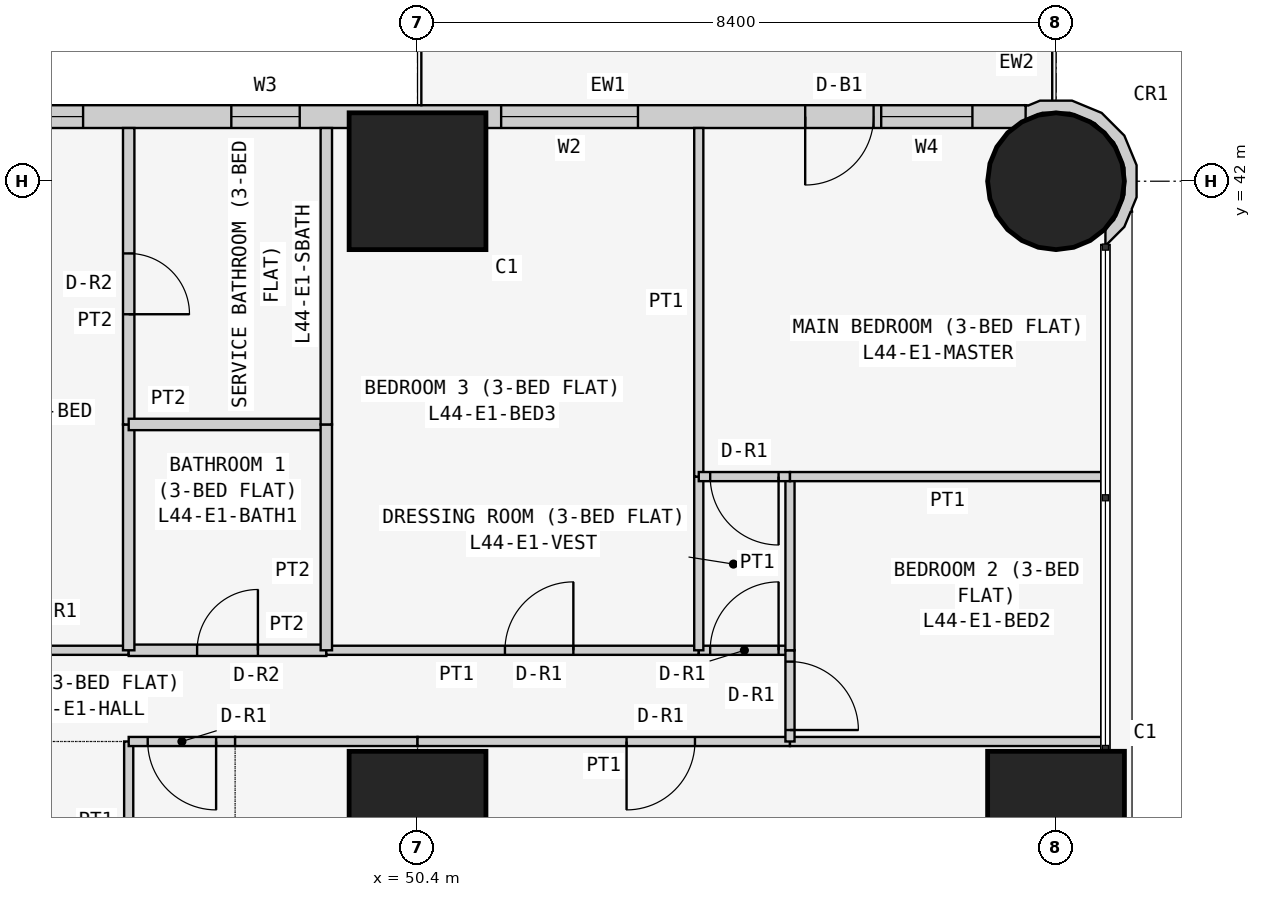
"""IFC4 building model, lengths in metres.
Left out: names, types, materials, properties, quantities, classifications, styles, units other than length and angle.
Written with IfcOpenShell. Run it as: python <this file> out.ifc"""

import sys

from ifc_helpers import new_model, si_unit, direction, frame, frame_2d, origin, origin_2d, place, context, subcontext, project, spatial, polyline, rectangle, circle, outline, extrude, element, fill, save


model = new_model("IFC4")
c1 = context("Model", 3, precision=1e-05, world=origin(), true_north=direction((0.0, 1.0)))
c2 = subcontext(c1, "Body", "Model", "MODEL_VIEW")
j1 = project(units=[si_unit("LENGTHUNIT", "METRE"), si_unit("PLANEANGLEUNIT", "RADIAN")], contexts=[c1])
p1 = place(None, origin())
s1 = spatial("IfcSite", under=j1, at=p1, CompositionType="ELEMENT")
p2 = place(p1, origin())
s2 = spatial("IfcBuilding", under=s1, at=p2, CompositionType="ELEMENT")
p3 = place(p2, frame((0.0, 0.0, 170.1)))
s3 = spatial("IfcBuildingStorey", under=s2, at=p3, CompositionType="ELEMENT", Elevation=170.1)
for number, where, z_axis, x_axis in (
    (1, (50.4, 33.6, 0.0), (0.0, 0.0, 1.0), (1.0, 0.0, 0.0)),
    (2, (50.4, 42.0, 0.0), (0.0, 0.0, 1.0), (1.0, 0.0, 0.0)),
    (3, (58.8, 33.6, 0.0), (0.0, 0.0, 1.0), (1.0, 0.0, 0.0)),
):
    element("IfcColumn", number, at=place(p3, frame(where, z_axis=z_axis, x_axis=x_axis)), inside=s3, PredefinedType="COLUMN", context=c2, shape_type="SweptSolid", body=[
        extrude(rectangle(XDim=1.8, YDim=1.8, at=origin_2d()), origin(), (0.0, 0.0, 1.0), 3.6),
    ])
p4 = place(p3, frame((58.8, 42.0, 0.0), z_axis=(0.0, 0.0, 1.0), x_axis=(1.0, 0.0, 0.0)))
e4 = element("IfcColumn", 4, at=p4, inside=s3, PredefinedType="COLUMN", context=c2, shape_type="SweptSolid", body=[
    extrude(circle(Radius=0.9, at=origin_2d()), origin(), (0.0, 0.0, 1.0), 3.6),
])
p5 = place(p3, frame((58.4, 42.85, 0.0), z_axis=(0.0, 0.0, 1.0), x_axis=(-1.0, 0.0, 0.0)))
e5 = element("IfcWall", 5, at=p5, inside=s3, PredefinedType="SOLIDWALL", context=c2, shape_type="SweptSolid", body=[
    extrude(rectangle(XDim=15.7, YDim=0.3, at=frame_2d((7.85, 0.0))), origin(), (0.0, 0.0, 1.0), 3.45),
])
p6 = place(p5, frame((12.4, 0.0, 0.9)))
e6 = element("IfcOpeningElement", 6, at=p6, cuts=e5, PredefinedType="OPENING", context=c2, shape_type="SweptSolid", body=[
    extrude(rectangle(XDim=1.8, YDim=1.5, at=frame_2d((0.9, 0.75))), frame((0.0, 0.16, 0.0), z_axis=(0.0, -1.0, 0.0), x_axis=(1.0, 0.0, 0.0)), (0.0, 0.0, 1.0), 0.32),
])
p7 = place(p5, frame((9.55, 0.0, 1.5)))
e7 = element("IfcOpeningElement", 7, at=p7, cuts=e5, PredefinedType="OPENING", context=c2, shape_type="SweptSolid", body=[
    extrude(rectangle(XDim=0.9, YDim=0.7, at=frame_2d((0.45, 0.35))), frame((0.0, 0.16, 0.0), z_axis=(0.0, -1.0, 0.0), x_axis=(1.0, 0.0, 0.0)), (0.0, 0.0, 1.0), 0.32),
])
p8 = place(p5, frame((5.1, 0.0, 0.9)))
e8 = element("IfcOpeningElement", 8, at=p8, cuts=e5, PredefinedType="OPENING", context=c2, shape_type="SweptSolid", body=[
    extrude(rectangle(XDim=1.8, YDim=1.5, at=frame_2d((0.9, 0.75))), frame((0.0, 0.16, 0.0), z_axis=(0.0, -1.0, 0.0), x_axis=(1.0, 0.0, 0.0)), (0.0, 0.0, 1.0), 0.32),
])
p9 = place(p5, frame((2.0, 0.0, 0.0)))
e9 = element("IfcOpeningElement", 9, at=p9, cuts=e5, PredefinedType="OPENING", context=c2, shape_type="SweptSolid", body=[
    extrude(rectangle(XDim=0.9, YDim=2.4, at=frame_2d((0.45, 1.2))), frame((0.0, 0.16, 0.0), z_axis=(0.0, -1.0, 0.0), x_axis=(1.0, 0.0, 0.0)), (0.0, 0.0, 1.0), 0.32),
])
p10 = place(p5, frame((0.7, 0.0, 0.9)))
e10 = element("IfcOpeningElement", 10, at=p10, cuts=e5, PredefinedType="OPENING", context=c2, shape_type="SweptSolid", body=[
    extrude(rectangle(XDim=1.2, YDim=1.5, at=frame_2d((0.6, 0.75))), frame((0.0, 0.16, 0.0), z_axis=(0.0, -1.0, 0.0), x_axis=(1.0, 0.0, 0.0)), (0.0, 0.0, 1.0), 0.32),
])
p11 = place(p3, frame((59.411, 41.233, 0.0), z_axis=(0.0, 0.0, 1.0), x_axis=(0.926129809145, 0.377204953059, 0.0)))
e11 = element("IfcWall", 11, at=p11, inside=s3, PredefinedType="SOLIDWALL", context=c2, shape_type="SweptSolid", body=[
    extrude(outline(polyline([(0.626, 0.345), (0.785, 0.736), (0.782, 1.157), (0.619, 1.546), (0.319, 1.843), (-0.072, 2.002), (-0.24, 2.001), (-0.27, 2.017), (-0.37, 1.841), (-0.102, 1.842), (0.23, 1.707), (0.485, 1.455), (0.624, 1.125), (0.626, 0.766), (0.491, 0.434), (0.238, 0.179), (0.09, 0.117), (0.011, -0.078), (0.024, -0.083), (0.329, 0.045), (0.48, 0.198), (0.499, 0.193), (0.508, 0.225), (0.626, 0.345)])), origin(), (0.0, 0.0, 1.0), 3.45),
])
p12 = place(p3, frame((46.6, 29.4, 0.0), z_axis=(0.0, 0.0, 1.0), x_axis=(0.0, 1.0, 0.0)))
e12 = element("IfcWall", 12, at=p12, inside=s3, PredefinedType="PARTITIONING", context=c2, shape_type="SweptSolid", body=[
    extrude(rectangle(XDim=5.229, YDim=0.12, at=frame_2d((2.615, 0.0))), origin(), (0.0, 0.0, 1.0), 3.45),
])
p13 = place(p3, frame((48.0, 34.629, 0.0), z_axis=(0.0, 0.0, 1.0), x_axis=(-1.0, 0.0, 0.0)))
e13 = element("IfcWall", 13, at=p13, inside=s3, PredefinedType="PARTITIONING", context=c2, shape_type="SweptSolid", body=[
    extrude(rectangle(XDim=1.4, YDim=0.12, at=frame_2d((0.7, 0.0))), origin(), (0.0, 0.0, 1.0), 3.45),
])
p14 = place(p13, frame((0.25, 0.0, 0.0)))
e14 = element("IfcOpeningElement", 14, at=p14, cuts=e13, PredefinedType="OPENING", context=c2, shape_type="SweptSolid", body=[
    extrude(rectangle(XDim=0.9, YDim=2.1, at=frame_2d((0.45, 1.05))), frame((0.0, 0.07, 0.0), z_axis=(0.0, -1.0, 0.0), x_axis=(1.0, 0.0, 0.0)), (0.0, 0.0, 1.0), 0.14),
])
p15 = place(p3, frame((50.4, 34.629, 0.0), z_axis=(0.0, 0.0, 1.0), x_axis=(-1.0, 0.0, 0.0)))
e15 = element("IfcWall", 15, at=p15, inside=s3, PredefinedType="PARTITIONING", context=c2, shape_type="SweptSolid", body=[
    extrude(rectangle(XDim=2.4, YDim=0.12, at=frame_2d((1.2, 0.0))), origin(), (0.0, 0.0, 1.0), 3.45),
])
p16 = place(p3, frame((55.3, 34.629, 0.0), z_axis=(0.0, 0.0, 1.0), x_axis=(-1.0, 0.0, 0.0)))
e16 = element("IfcWall", 16, at=p16, inside=s3, PredefinedType="PARTITIONING", context=c2, shape_type="SweptSolid", body=[
    extrude(rectangle(XDim=4.9, YDim=0.12, at=frame_2d((2.45, 0.0))), origin(), (0.0, 0.0, 1.0), 3.45),
])
p17 = place(p16, frame((1.25, 0.0, 0.0)))
e17 = element("IfcOpeningElement", 17, at=p17, cuts=e16, PredefinedType="OPENING", context=c2, shape_type="SweptSolid", body=[
    extrude(rectangle(XDim=0.9, YDim=2.1, at=frame_2d((0.45, 1.05))), frame((0.0, 0.07, 0.0), z_axis=(0.0, -1.0, 0.0), x_axis=(1.0, 0.0, 0.0)), (0.0, 0.0, 1.0), 0.14),
])
p18 = place(p3, frame((59.45, 34.629, 0.0), z_axis=(0.0, 0.0, 1.0), x_axis=(-1.0, 0.0, 0.0)))
e18 = element("IfcWall", 18, at=p18, inside=s3, PredefinedType="PARTITIONING", context=c2, shape_type="SweptSolid", body=[
    extrude(rectangle(XDim=4.15, YDim=0.12, at=frame_2d((2.075, 0.0))), origin(), (0.0, 0.0, 1.0), 3.45),
])
p19 = place(p3, frame((46.6, 35.829, 0.0), z_axis=(0.0, 0.0, 1.0), x_axis=(-1.0, 0.0, 0.0)))
e19 = element("IfcWall", 19, at=p19, inside=s3, PredefinedType="PARTITIONING", context=c2, shape_type="SweptSolid", body=[
    extrude(rectangle(XDim=3.575, YDim=0.12, at=frame_2d((1.788, 0.0))), origin(), (0.0, 0.0, 1.0), 3.45),
])
p20 = place(p19, frame((1.35, 0.0, 0.0)))
e20 = element("IfcOpeningElement", 20, at=p20, cuts=e19, PredefinedType="OPENING", context=c2, shape_type="SweptSolid", body=[
    extrude(rectangle(XDim=0.9, YDim=2.1, at=frame_2d((0.45, 1.05))), frame((0.0, 0.07, 0.0), z_axis=(0.0, -1.0, 0.0), x_axis=(1.0, 0.0, 0.0)), (0.0, 0.0, 1.0), 0.14),
])
p21 = place(p3, frame((49.2, 35.829, 0.0), z_axis=(0.0, 0.0, 1.0), x_axis=(-1.0, 0.0, 0.0)))
e21 = element("IfcWall", 21, at=p21, inside=s3, PredefinedType="PARTITIONING", context=c2, shape_type="SweptSolid", body=[
    extrude(rectangle(XDim=2.6, YDim=0.15, at=frame_2d((1.3, 0.0))), origin(), (0.0, 0.0, 1.0), 3.45),
])
p22 = place(p21, frame((0.9, 0.0, 0.0)))
e22 = element("IfcOpeningElement", 22, at=p22, cuts=e21, PredefinedType="OPENING", context=c2, shape_type="SweptSolid", body=[
    extrude(rectangle(XDim=0.8, YDim=2.1, at=frame_2d((0.4, 1.05))), frame((0.0, 0.085, 0.0), z_axis=(0.0, -1.0, 0.0), x_axis=(1.0, 0.0, 0.0)), (0.0, 0.0, 1.0), 0.17),
])
p23 = place(p3, frame((54.1, 35.829, 0.0), z_axis=(0.0, 0.0, 1.0), x_axis=(-1.0, 0.0, 0.0)))
e23 = element("IfcWall", 23, at=p23, inside=s3, PredefinedType="PARTITIONING", context=c2, shape_type="SweptSolid", body=[
    extrude(rectangle(XDim=4.9, YDim=0.12, at=frame_2d((2.45, 0.0))), origin(), (0.0, 0.0, 1.0), 3.45),
])
p24 = place(p23, frame((1.65, 0.0, 0.0)))
e24 = element("IfcOpeningElement", 24, at=p24, cuts=e23, PredefinedType="OPENING", context=c2, shape_type="SweptSolid", body=[
    extrude(rectangle(XDim=0.9, YDim=2.1, at=frame_2d((0.45, 1.05))), frame((0.0, 0.07, 0.0), z_axis=(0.0, -1.0, 0.0), x_axis=(1.0, 0.0, 0.0)), (0.0, 0.0, 1.0), 0.14),
])
p25 = place(p3, frame((55.3, 35.829, 0.0), z_axis=(0.0, 0.0, 1.0), x_axis=(-1.0, 0.0, 0.0)))
e25 = element("IfcWall", 25, at=p25, inside=s3, PredefinedType="PARTITIONING", context=c2, shape_type="SweptSolid", body=[
    extrude(rectangle(XDim=1.2, YDim=0.12, at=frame_2d((0.6, 0.0))), origin(), (0.0, 0.0, 1.0), 3.45),
])
p26 = place(p25, frame((0.15, 0.0, 0.0)))
e26 = element("IfcOpeningElement", 26, at=p26, cuts=e25, PredefinedType="OPENING", context=c2, shape_type="SweptSolid", body=[
    extrude(rectangle(XDim=0.9, YDim=2.1, at=frame_2d((0.45, 1.05))), frame((0.0, 0.07, 0.0), z_axis=(0.0, -1.0, 0.0), x_axis=(1.0, 0.0, 0.0)), (0.0, 0.0, 1.0), 0.14),
])
p27 = place(p3, frame((55.3, 34.629, 0.0), z_axis=(0.0, 0.0, 1.0), x_axis=(0.0, 1.0, 0.0)))
e27 = element("IfcWall", 27, at=p27, inside=s3, PredefinedType="PARTITIONING", context=c2, shape_type="SweptSolid", body=[
    extrude(rectangle(XDim=1.2, YDim=0.12, at=frame_2d((0.6, 0.0))), origin(), (0.0, 0.0, 1.0), 3.45),
])
p28 = place(p27, frame((0.151, 0.0, 0.0)))
e28 = element("IfcOpeningElement", 28, at=p28, cuts=e27, PredefinedType="OPENING", context=c2, shape_type="SweptSolid", body=[
    extrude(rectangle(XDim=0.9, YDim=2.1, at=frame_2d((0.45, 1.05))), frame((0.0, 0.07, 0.0), z_axis=(0.0, -1.0, 0.0), x_axis=(1.0, 0.0, 0.0)), (0.0, 0.0, 1.0), 0.14),
])
p29 = place(p3, frame((46.6, 35.829, 0.0), z_axis=(0.0, 0.0, 1.0), x_axis=(0.0, 1.0, 0.0)))
e29 = element("IfcWall", 29, at=p29, inside=s3, PredefinedType="PARTITIONING", context=c2, shape_type="SweptSolid", body=[
    extrude(rectangle(XDim=2.971, YDim=0.15, at=frame_2d((1.485, 0.0))), origin(), (0.0, 0.0, 1.0), 3.45),
])
p30 = place(p3, frame((46.6, 38.8, 0.0), z_axis=(0.0, 0.0, 1.0), x_axis=(0.0, 1.0, 0.0)))
e30 = element("IfcWall", 30, at=p30, inside=s3, PredefinedType="PARTITIONING", context=c2, shape_type="SweptSolid", body=[
    extrude(rectangle(XDim=3.9, YDim=0.15, at=frame_2d((1.95, 0.0))), origin(), (0.0, 0.0, 1.0), 3.45),
])
p31 = place(p30, frame((1.45, 0.0, 0.0)))
e31 = element("IfcOpeningElement", 31, at=p31, cuts=e30, PredefinedType="OPENING", context=c2, shape_type="SweptSolid", body=[
    extrude(rectangle(XDim=0.8, YDim=2.1, at=frame_2d((0.4, 1.05))), frame((0.0, 0.085, 0.0), z_axis=(0.0, -1.0, 0.0), x_axis=(1.0, 0.0, 0.0)), (0.0, 0.0, 1.0), 0.17),
])
p32 = place(p3, frame((49.2, 38.8, 0.0), z_axis=(0.0, 0.0, 1.0), x_axis=(-1.0, 0.0, 0.0)))
e32 = element("IfcWall", 32, at=p32, inside=s3, PredefinedType="PARTITIONING", context=c2, shape_type="SweptSolid", body=[
    extrude(rectangle(XDim=2.6, YDim=0.15, at=frame_2d((1.3, 0.0))), origin(), (0.0, 0.0, 1.0), 3.45),
])
p33 = place(p3, frame((49.2, 35.829, 0.0), z_axis=(0.0, 0.0, 1.0), x_axis=(0.0, 1.0, 0.0)))
e33 = element("IfcWall", 33, at=p33, inside=s3, PredefinedType="PARTITIONING", context=c2, shape_type="SweptSolid", body=[
    extrude(rectangle(XDim=2.971, YDim=0.15, at=frame_2d((1.485, 0.0))), origin(), (0.0, 0.0, 1.0), 3.45),
])
p34 = place(p3, frame((49.2, 38.8, 0.0), z_axis=(0.0, 0.0, 1.0), x_axis=(0.0, 1.0, 0.0)))
e34 = element("IfcWall", 34, at=p34, inside=s3, PredefinedType="PARTITIONING", context=c2, shape_type="SweptSolid", body=[
    extrude(rectangle(XDim=3.9, YDim=0.15, at=frame_2d((1.95, 0.0))), origin(), (0.0, 0.0, 1.0), 3.45),
])
p35 = place(p3, frame((54.1, 35.829, 0.0), z_axis=(0.0, 0.0, 1.0), x_axis=(0.0, 1.0, 0.0)))
e35 = element("IfcWall", 35, at=p35, inside=s3, PredefinedType="PARTITIONING", context=c2, shape_type="SweptSolid", body=[
    extrude(rectangle(XDim=2.285, YDim=0.12, at=frame_2d((1.143, 0.0))), origin(), (0.0, 0.0, 1.0), 3.45),
])
p36 = place(p3, frame((54.1, 38.114, 0.0), z_axis=(0.0, 0.0, 1.0), x_axis=(0.0, 1.0, 0.0)))
e36 = element("IfcWall", 36, at=p36, inside=s3, PredefinedType="PARTITIONING", context=c2, shape_type="SweptSolid", body=[
    extrude(rectangle(XDim=4.586, YDim=0.12, at=frame_2d((2.293, 0.0))), origin(), (0.0, 0.0, 1.0), 3.45),
])
p37 = place(p3, frame((55.3, 35.829, 0.0), z_axis=(0.0, 0.0, 1.0), x_axis=(0.0, 1.0, 0.0)))
e37 = element("IfcWall", 37, at=p37, inside=s3, PredefinedType="PARTITIONING", context=c2, shape_type="SweptSolid", body=[
    extrude(rectangle(XDim=2.285, YDim=0.12, at=frame_2d((1.143, 0.0))), origin(), (0.0, 0.0, 1.0), 3.45),
])
p38 = place(p3, frame((55.3, 38.114, 0.0), z_axis=(0.0, 0.0, 1.0), x_axis=(-1.0, 0.0, 0.0)))
e38 = element("IfcWall", 38, at=p38, inside=s3, PredefinedType="PARTITIONING", context=c2, shape_type="SweptSolid", body=[
    extrude(rectangle(XDim=1.2, YDim=0.12, at=frame_2d((0.6, 0.0))), origin(), (0.0, 0.0, 1.0), 3.45),
])
p39 = place(p38, frame((0.15, 0.0, 0.0)))
e39 = element("IfcOpeningElement", 39, at=p39, cuts=e38, PredefinedType="OPENING", context=c2, shape_type="SweptSolid", body=[
    extrude(rectangle(XDim=0.9, YDim=2.1, at=frame_2d((0.45, 1.05))), frame((0.0, 0.07, 0.0), z_axis=(0.0, -1.0, 0.0), x_axis=(1.0, 0.0, 0.0)), (0.0, 0.0, 1.0), 0.14),
])
p40 = place(p3, frame((59.45, 38.114, 0.0), z_axis=(0.0, 0.0, 1.0), x_axis=(-1.0, 0.0, 0.0)))
e40 = element("IfcWall", 40, at=p40, inside=s3, PredefinedType="PARTITIONING", context=c2, shape_type="SweptSolid", body=[
    extrude(rectangle(XDim=4.15, YDim=0.12, at=frame_2d((2.075, 0.0))), origin(), (0.0, 0.0, 1.0), 3.45),
])
p41 = place(p6, origin())
e41 = element("IfcWindow", 41, at=p41, inside=s3, PartitioningType="SINGLE_PANEL", PredefinedType="WINDOW", context=c2, shape_type="SweptSolid", body=[
    extrude(rectangle(XDim=1.8, YDim=1.5, at=frame_2d((0.9, 0.75))), frame((0.0, 0.03, 0.0), z_axis=(0.0, -1.0, 0.0), x_axis=(1.0, 0.0, 0.0)), (0.0, 0.0, 1.0), 0.06),
])
fill(e6, e41)
p42 = place(p7, origin())
e42 = element("IfcWindow", 42, at=p42, inside=s3, PartitioningType="SINGLE_PANEL", PredefinedType="WINDOW", context=c2, shape_type="SweptSolid", body=[
    extrude(rectangle(XDim=0.9, YDim=0.7, at=frame_2d((0.45, 0.35))), frame((0.0, 0.03, 0.0), z_axis=(0.0, -1.0, 0.0), x_axis=(1.0, 0.0, 0.0)), (0.0, 0.0, 1.0), 0.06),
])
fill(e7, e42)
p43 = place(p8, origin())
e43 = element("IfcWindow", 43, at=p43, inside=s3, PartitioningType="SINGLE_PANEL", PredefinedType="WINDOW", context=c2, shape_type="SweptSolid", body=[
    extrude(rectangle(XDim=1.8, YDim=1.5, at=frame_2d((0.9, 0.75))), frame((0.0, 0.03, 0.0), z_axis=(0.0, -1.0, 0.0), x_axis=(1.0, 0.0, 0.0)), (0.0, 0.0, 1.0), 0.06),
])
fill(e8, e43)
p44 = place(p9, origin())
e44 = element("IfcDoor", 44, at=p44, inside=s3, OperationType="SINGLE_SWING_RIGHT", PredefinedType="DOOR", context=c2, shape_type="SweptSolid", body=[
    extrude(rectangle(XDim=0.9, YDim=2.4, at=frame_2d((0.45, 1.2))), frame((0.0, 0.025, 0.0), z_axis=(0.0, -1.0, 0.0), x_axis=(1.0, 0.0, 0.0)), (0.0, 0.0, 1.0), 0.05),
])
fill(e9, e44)
p45 = place(p10, origin())
e45 = element("IfcWindow", 45, at=p45, inside=s3, PartitioningType="SINGLE_PANEL", PredefinedType="WINDOW", context=c2, shape_type="SweptSolid", body=[
    extrude(rectangle(XDim=1.2, YDim=1.5, at=frame_2d((0.6, 0.75))), frame((0.0, 0.03, 0.0), z_axis=(0.0, -1.0, 0.0), x_axis=(1.0, 0.0, 0.0)), (0.0, 0.0, 1.0), 0.06),
])
fill(e10, e45)
p46 = place(p14, origin())
e46 = element("IfcDoor", 46, at=p46, inside=s3, OperationType="SINGLE_SWING_LEFT", PredefinedType="DOOR", context=c2, shape_type="SweptSolid", body=[
    extrude(rectangle(XDim=0.9, YDim=2.1, at=frame_2d((0.45, 1.05))), frame((0.0, 0.025, 0.0), z_axis=(0.0, -1.0, 0.0), x_axis=(1.0, 0.0, 0.0)), (0.0, 0.0, 1.0), 0.05),
])
fill(e14, e46)
p47 = place(p17, origin())
e47 = element("IfcDoor", 47, at=p47, inside=s3, OperationType="SINGLE_SWING_RIGHT", PredefinedType="DOOR", context=c2, shape_type="SweptSolid", body=[
    extrude(rectangle(XDim=0.9, YDim=2.1, at=frame_2d((0.45, 1.05))), frame((0.0, 0.025, 0.0), z_axis=(0.0, -1.0, 0.0), x_axis=(1.0, 0.0, 0.0)), (0.0, 0.0, 1.0), 0.05),
])
fill(e17, e47)
p48 = place(p31, frame((0.8, 0.0, 0.0), z_axis=(0.0, 0.0, 1.0), x_axis=(-1.0, 0.0, 0.0)))
e48 = element("IfcDoor", 48, at=p48, inside=s3, OperationType="SINGLE_SWING_RIGHT", PredefinedType="DOOR", context=c2, shape_type="SweptSolid", body=[
    extrude(rectangle(XDim=0.8, YDim=2.1, at=frame_2d((0.4, 1.05))), frame((0.0, 0.025, 0.0), z_axis=(0.0, -1.0, 0.0), x_axis=(1.0, 0.0, 0.0)), (0.0, 0.0, 1.0), 0.05),
])
fill(e31, e48)
p49 = place(p22, frame((0.8, 0.0, 0.0), z_axis=(0.0, 0.0, 1.0), x_axis=(-1.0, 0.0, 0.0)))
e49 = element("IfcDoor", 49, at=p49, inside=s3, OperationType="SINGLE_SWING_RIGHT", PredefinedType="DOOR", context=c2, shape_type="SweptSolid", body=[
    extrude(rectangle(XDim=0.8, YDim=2.1, at=frame_2d((0.4, 1.05))), frame((0.0, 0.025, 0.0), z_axis=(0.0, -1.0, 0.0), x_axis=(1.0, 0.0, 0.0)), (0.0, 0.0, 1.0), 0.05),
])
fill(e22, e49)
p50 = place(p24, frame((0.9, 0.0, 0.0), z_axis=(0.0, 0.0, 1.0), x_axis=(-1.0, 0.0, 0.0)))
e50 = element("IfcDoor", 50, at=p50, inside=s3, OperationType="SINGLE_SWING_RIGHT", PredefinedType="DOOR", context=c2, shape_type="SweptSolid", body=[
    extrude(rectangle(XDim=0.9, YDim=2.1, at=frame_2d((0.45, 1.05))), frame((0.0, 0.025, 0.0), z_axis=(0.0, -1.0, 0.0), x_axis=(1.0, 0.0, 0.0)), (0.0, 0.0, 1.0), 0.05),
])
fill(e24, e50)
p51 = place(p26, frame((0.9, 0.0, 0.0), z_axis=(0.0, 0.0, 1.0), x_axis=(-1.0, 0.0, 0.0)))
e51 = element("IfcDoor", 51, at=p51, inside=s3, OperationType="SINGLE_SWING_RIGHT", PredefinedType="DOOR", context=c2, shape_type="SweptSolid", body=[
    extrude(rectangle(XDim=0.9, YDim=2.1, at=frame_2d((0.45, 1.05))), frame((0.0, 0.025, 0.0), z_axis=(0.0, -1.0, 0.0), x_axis=(1.0, 0.0, 0.0)), (0.0, 0.0, 1.0), 0.05),
])
fill(e26, e51)
p52 = place(p39, origin())
e52 = element("IfcDoor", 52, at=p52, inside=s3, OperationType="SINGLE_SWING_LEFT", PredefinedType="DOOR", context=c2, shape_type="SweptSolid", body=[
    extrude(rectangle(XDim=0.9, YDim=2.1, at=frame_2d((0.45, 1.05))), frame((0.0, 0.025, 0.0), z_axis=(0.0, -1.0, 0.0), x_axis=(1.0, 0.0, 0.0)), (0.0, 0.0, 1.0), 0.05),
])
fill(e39, e52)
p53 = place(p28, frame((0.9, 0.0, 0.0), z_axis=(0.0, 0.0, 1.0), x_axis=(-1.0, 0.0, 0.0)))
e53 = element("IfcDoor", 53, at=p53, inside=s3, OperationType="SINGLE_SWING_RIGHT", PredefinedType="DOOR", context=c2, shape_type="SweptSolid", body=[
    extrude(rectangle(XDim=0.9, YDim=2.1, at=frame_2d((0.45, 1.05))), frame((0.0, 0.025, 0.0), z_axis=(0.0, -1.0, 0.0), x_axis=(1.0, 0.0, 0.0)), (0.0, 0.0, 1.0), 0.05),
])
fill(e28, e53)
save(model, sys.argv[1])
